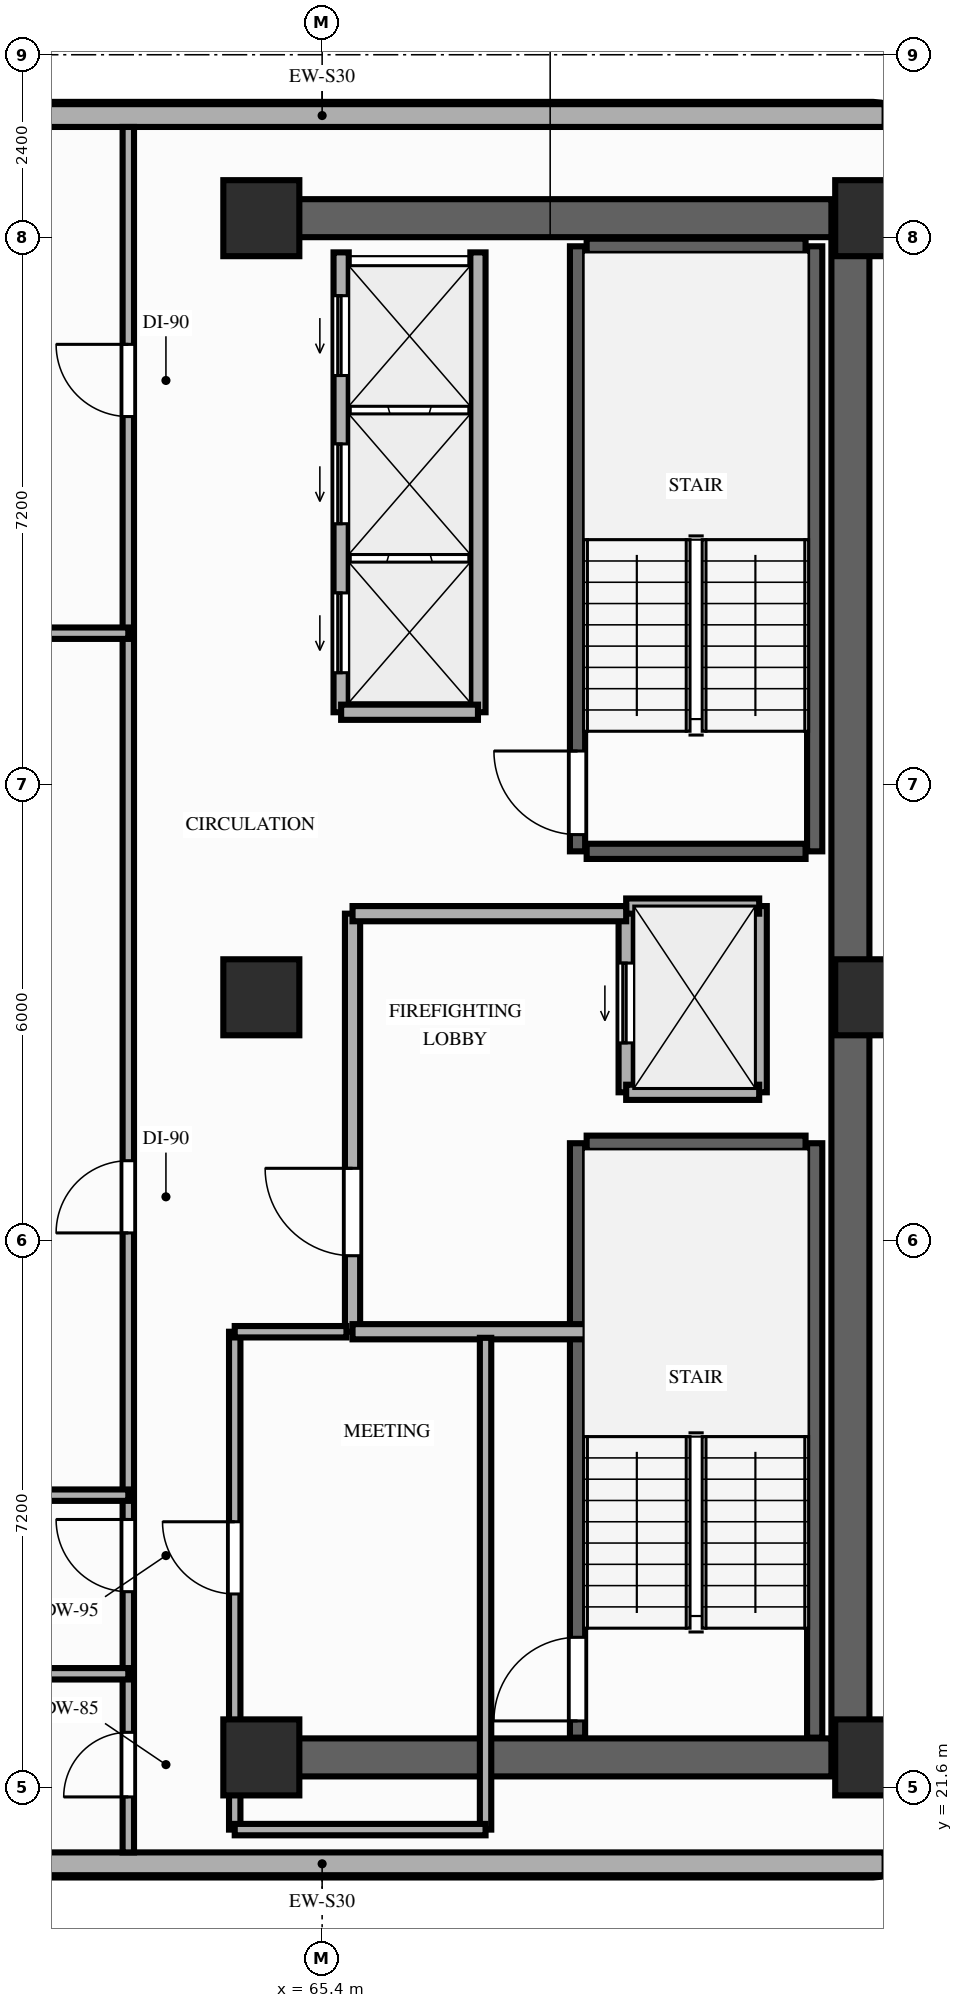
"""IFC4 building model, lengths in metres.
Left out: names, types, materials, properties, quantities, classifications, styles, units other than length and angle.
Written with IfcOpenShell. Run it as: python <this file> out.ifc"""

import sys

from ifc_helpers import new_model, si_unit, direction, frame, frame_2d, origin, origin_2d, place, context, subcontext, project, spatial, rectangle, extrude, element, fill, save


model = new_model("IFC4")
c1 = context("Model", 3, precision=1e-05, world=origin(), true_north=direction((0.0, 1.0)))
c2 = subcontext(c1, "Body", "Model", "MODEL_VIEW")
j1 = project(units=[si_unit("LENGTHUNIT", "METRE"), si_unit("PLANEANGLEUNIT", "RADIAN")], contexts=[c1])
p1 = place(None, origin())
s1 = spatial("IfcSite", under=j1, at=p1, CompositionType="ELEMENT")
p2 = place(p1, origin())
s2 = spatial("IfcBuilding", under=s1, at=p2, CompositionType="ELEMENT")
p3 = place(p2, frame((0.0, 0.0, 89.8)))
s3 = spatial("IfcBuildingStorey", under=s2, at=p3, CompositionType="ELEMENT", Elevation=89.8)
for number, where, z_axis, x_axis in (
    (1, (64.6, 22.0, 0.0), (0.0, 0.0, 1.0), (1.0, 0.0, 0.0)),
    (2, (72.65, 22.0, 0.0), (0.0, 0.0, 1.0), (1.0, 0.0, 0.0)),
    (3, (64.6, 32.0, 0.0), (0.0, 0.0, 1.0), (1.0, 0.0, 0.0)),
    (4, (72.65, 32.0, 0.0), (0.0, 0.0, 1.0), (1.0, 0.0, 0.0)),
    (5, (64.6, 42.25, 0.0), (0.0, 0.0, 1.0), (1.0, 0.0, 0.0)),
    (6, (72.65, 42.25, 0.0), (0.0, 0.0, 1.0), (1.0, 0.0, 0.0)),
):
    element("IfcColumn", number, at=place(p3, frame(where, z_axis=z_axis, x_axis=x_axis)), inside=s3, PredefinedType="COLUMN", context=c2, shape_type="SweptSolid", body=[
        extrude(rectangle(XDim=1.0, YDim=1.0, at=origin_2d()), origin(), (0.0, 0.0, 1.0), 3.2),
    ])
for number, where, z_axis, x_axis in (
    (7, (72.8, 43.6, 0.0), (0.0, 0.0, 1.0), (-1.0, 0.0, 0.0)),
    (8, (58.0, 20.6, 0.0), (0.0, 0.0, 1.0), (1.0, 0.0, 0.0)),
):
    element("IfcWall", number, at=place(p3, frame(where, z_axis=z_axis, x_axis=x_axis)), inside=s3, PredefinedType="STANDARD", context=c2, shape_type="SweptSolid", body=[
        extrude(rectangle(XDim=14.8, YDim=0.3, at=frame_2d((7.4, 0.0))), origin(), (0.0, 0.0, 1.0), 3.02),
    ])
p4 = place(p3, frame((72.35, 22.0, 0.0), z_axis=(0.0, 0.0, 1.0), x_axis=(0.0, 1.0, 0.0)))
e9 = element("IfcWall", 9, at=p4, inside=s3, PredefinedType="SHEAR", context=c2, shape_type="SweptSolid", body=[
    extrude(rectangle(XDim=20.25, YDim=0.5, at=frame_2d((10.125, 0.0))), origin(), (0.0, 0.0, 1.0), 3.02),
])
for number, where, z_axis, x_axis in (
    (10, (64.6, 42.25, 0.0), (0.0, 0.0, 1.0), (1.0, 0.0, 0.0)),
    (11, (64.6, 22.0, 0.0), (0.0, 0.0, 1.0), (1.0, 0.0, 0.0)),
):
    element("IfcWall", number, at=place(p3, frame(where, z_axis=z_axis, x_axis=x_axis)), inside=s3, PredefinedType="SHEAR", context=c2, shape_type="SweptSolid", body=[
        extrude(rectangle(XDim=7.5, YDim=0.5, at=frame_2d((3.75, 0.0))), origin(), (0.0, 0.0, 1.0), 3.02),
    ])
p5 = place(p3, frame((68.76, 22.26, 0.0), z_axis=(0.0, 0.0, 1.0), x_axis=(0.0, 1.0, 0.0)))
e12 = element("IfcWall", 12, at=p5, inside=s3, PredefinedType="SHEAR", context=c2, shape_type="SweptSolid", body=[
    extrude(rectangle(XDim=7.82, YDim=0.2, at=frame_2d((3.91, 0.0))), origin(), (0.0, 0.0, 1.0), 3.02),
])
p6 = place(p5, frame((0.22, 0.0, 0.0)))
e13 = element("IfcOpeningElement", 13, at=p6, cuts=e12, PredefinedType="OPENING", context=c2, shape_type="SweptSolid", body=[
    extrude(rectangle(XDim=1.1, YDim=2.15, at=frame_2d((0.55, 1.075))), frame((0.0, 0.11, 0.0), z_axis=(0.0, -1.0, 0.0), x_axis=(1.0, 0.0, 0.0)), (0.0, 0.0, 1.0), 0.22),
])
p7 = place(p3, frame((71.88, 22.26, 0.0), z_axis=(0.0, 0.0, 1.0), x_axis=(0.0, 1.0, 0.0)))
e14 = element("IfcWall", 14, at=p7, inside=s3, PredefinedType="SHEAR", context=c2, shape_type="SweptSolid", body=[
    extrude(rectangle(XDim=7.82, YDim=0.2, at=frame_2d((3.91, 0.0))), origin(), (0.0, 0.0, 1.0), 3.02),
])
p8 = place(p3, frame((68.88, 30.08, 0.0), z_axis=(0.0, 0.0, 1.0), x_axis=(1.0, 0.0, 0.0)))
e15 = element("IfcWall", 15, at=p8, inside=s3, PredefinedType="SHEAR", context=c2, shape_type="SweptSolid", body=[
    extrude(rectangle(XDim=2.88, YDim=0.2, at=frame_2d((1.44, 0.0))), origin(), (0.0, 0.0, 1.0), 3.02),
])
p9 = place(p3, frame((68.76, 33.92, 0.0), z_axis=(0.0, 0.0, 1.0), x_axis=(0.0, 1.0, 0.0)))
e16 = element("IfcWall", 16, at=p9, inside=s3, PredefinedType="SHEAR", context=c2, shape_type="SweptSolid", body=[
    extrude(rectangle(XDim=7.96, YDim=0.2, at=frame_2d((3.98, 0.0))), origin(), (0.0, 0.0, 1.0), 3.02),
])
p10 = place(p9, frame((0.22, 0.0, 0.0)))
e17 = element("IfcOpeningElement", 17, at=p10, cuts=e16, PredefinedType="OPENING", context=c2, shape_type="SweptSolid", body=[
    extrude(rectangle(XDim=1.1, YDim=2.15, at=frame_2d((0.55, 1.075))), frame((0.0, 0.11, 0.0), z_axis=(0.0, -1.0, 0.0), x_axis=(1.0, 0.0, 0.0)), (0.0, 0.0, 1.0), 0.22),
])
p11 = place(p3, frame((71.88, 33.92, 0.0), z_axis=(0.0, 0.0, 1.0), x_axis=(0.0, 1.0, 0.0)))
e18 = element("IfcWall", 18, at=p11, inside=s3, PredefinedType="SHEAR", context=c2, shape_type="SweptSolid", body=[
    extrude(rectangle(XDim=7.96, YDim=0.2, at=frame_2d((3.98, 0.0))), origin(), (0.0, 0.0, 1.0), 3.02),
])
for number, where, z_axis, x_axis in (
    (19, (68.88, 41.88, 0.0), (0.0, 0.0, 1.0), (1.0, 0.0, 0.0)),
    (20, (68.88, 33.92, 0.0), (0.0, 0.0, 1.0), (1.0, 0.0, 0.0)),
):
    element("IfcWall", number, at=place(p3, frame(where, z_axis=z_axis, x_axis=x_axis)), inside=s3, PredefinedType="SHEAR", context=c2, shape_type="SweptSolid", body=[
        extrude(rectangle(XDim=2.88, YDim=0.2, at=frame_2d((1.44, 0.0))), origin(), (0.0, 0.0, 1.0), 3.02),
    ])
p12 = place(p3, frame((65.65, 35.75, 0.0), z_axis=(0.0, 0.0, 1.0), x_axis=(0.0, 1.0, 0.0)))
e21 = element("IfcWall", 21, at=p12, inside=s3, PredefinedType="MOVABLE", context=c2, shape_type="SweptSolid", body=[
    extrude(rectangle(XDim=6.05, YDim=0.2, at=frame_2d((3.025, 0.0))), origin(), (0.0, 0.0, 1.0), 3.02),
])
p13 = place(p12, frame((0.52, 0.0, 0.0)))
e22 = element("IfcOpeningElement", 22, at=p13, cuts=e21, PredefinedType="OPENING", context=c2, shape_type="SweptSolid", body=[
    extrude(rectangle(XDim=1.05, YDim=2.15, at=frame_2d((0.525, 1.075))), frame((0.0, 0.11, 0.0), z_axis=(0.0, -1.0, 0.0), x_axis=(1.0, 0.0, 0.0)), (0.0, 0.0, 1.0), 0.22),
])
p14 = place(p12, frame((2.48, 0.0, 0.0)))
e23 = element("IfcOpeningElement", 23, at=p14, cuts=e21, PredefinedType="OPENING", context=c2, shape_type="SweptSolid", body=[
    extrude(rectangle(XDim=1.05, YDim=2.15, at=frame_2d((0.525, 1.075))), frame((0.0, 0.11, 0.0), z_axis=(0.0, -1.0, 0.0), x_axis=(1.0, 0.0, 0.0)), (0.0, 0.0, 1.0), 0.22),
])
p15 = place(p12, frame((4.43, 0.0, 0.0)))
e24 = element("IfcOpeningElement", 24, at=p15, cuts=e21, PredefinedType="OPENING", context=c2, shape_type="SweptSolid", body=[
    extrude(rectangle(XDim=1.05, YDim=2.15, at=frame_2d((0.525, 1.075))), frame((0.0, 0.11, 0.0), z_axis=(0.0, -1.0, 0.0), x_axis=(1.0, 0.0, 0.0)), (0.0, 0.0, 1.0), 0.22),
])
p16 = place(p3, frame((67.45, 35.75, 0.0), z_axis=(0.0, 0.0, 1.0), x_axis=(0.0, 1.0, 0.0)))
e25 = element("IfcWall", 25, at=p16, inside=s3, PredefinedType="MOVABLE", context=c2, shape_type="SweptSolid", body=[
    extrude(rectangle(XDim=6.05, YDim=0.2, at=frame_2d((3.025, 0.0))), origin(), (0.0, 0.0, 1.0), 3.02),
])
p17 = place(p3, frame((65.65, 35.75, 0.0), z_axis=(0.0, 0.0, 1.0), x_axis=(1.0, 0.0, 0.0)))
e26 = element("IfcWall", 26, at=p17, inside=s3, PredefinedType="MOVABLE", context=c2, shape_type="SweptSolid", body=[
    extrude(rectangle(XDim=1.8, YDim=0.2, at=frame_2d((0.9, 0.0))), origin(), (0.0, 0.0, 1.0), 3.02),
])
p18 = place(p3, frame((69.4, 30.75, 0.0), z_axis=(0.0, 0.0, 1.0), x_axis=(0.0, 1.0, 0.0)))
e27 = element("IfcWall", 27, at=p18, inside=s3, PredefinedType="MOVABLE", context=c2, shape_type="SweptSolid", body=[
    extrude(rectangle(XDim=2.45, YDim=0.2, at=frame_2d((1.225, 0.0))), origin(), (0.0, 0.0, 1.0), 3.02),
])
p19 = place(p18, frame((0.65, 0.0, 0.0)))
e28 = element("IfcOpeningElement", 28, at=p19, cuts=e27, PredefinedType="OPENING", context=c2, shape_type="SweptSolid", body=[
    extrude(rectangle(XDim=1.05, YDim=2.15, at=frame_2d((0.525, 1.075))), frame((0.0, 0.11, 0.0), z_axis=(0.0, -1.0, 0.0), x_axis=(1.0, 0.0, 0.0)), (0.0, 0.0, 1.0), 0.22),
])
p20 = place(p3, frame((71.15, 30.75, 0.0), z_axis=(0.0, 0.0, 1.0), x_axis=(0.0, 1.0, 0.0)))
e29 = element("IfcWall", 29, at=p20, inside=s3, PredefinedType="MOVABLE", context=c2, shape_type="SweptSolid", body=[
    extrude(rectangle(XDim=2.45, YDim=0.2, at=frame_2d((1.225, 0.0))), origin(), (0.0, 0.0, 1.0), 3.02),
])
for number, where, z_axis, x_axis in (
    (30, (69.4, 33.2, 0.0), (0.0, 0.0, 1.0), (1.0, 0.0, 0.0)),
    (31, (69.4, 30.75, 0.0), (0.0, 0.0, 1.0), (1.0, 0.0, 0.0)),
):
    element("IfcWall", number, at=place(p3, frame(where, z_axis=z_axis, x_axis=x_axis)), inside=s3, PredefinedType="MOVABLE", context=c2, shape_type="SweptSolid", body=[
        extrude(rectangle(XDim=1.75, YDim=0.2, at=frame_2d((0.875, 0.0))), origin(), (0.0, 0.0, 1.0), 3.02),
    ])
p21 = place(p3, frame((65.8, 27.6, 0.0), z_axis=(0.0, 0.0, 1.0), x_axis=(0.0, 1.0, 0.0)))
e32 = element("IfcWall", 32, at=p21, inside=s3, PredefinedType="PARTITIONING", context=c2, shape_type="SweptSolid", body=[
    extrude(rectangle(XDim=5.5, YDim=0.2, at=frame_2d((2.75, 0.0))), origin(), (0.0, 0.0, 1.0), 3.02),
])
p22 = place(p21, frame((1.0, 0.0, 0.0)))
e33 = element("IfcOpeningElement", 33, at=p22, cuts=e32, PredefinedType="OPENING", context=c2, shape_type="SweptSolid", body=[
    extrude(rectangle(XDim=1.15, YDim=2.15, at=frame_2d((0.575, 1.075))), frame((0.0, 0.11, 0.0), z_axis=(0.0, -1.0, 0.0), x_axis=(1.0, 0.0, 0.0)), (0.0, 0.0, 1.0), 0.22),
])
p23 = place(p3, frame((65.8, 33.1, 0.0), z_axis=(0.0, 0.0, 1.0), x_axis=(1.0, 0.0, 0.0)))
e34 = element("IfcWall", 34, at=p23, inside=s3, PredefinedType="PARTITIONING", context=c2, shape_type="SweptSolid", body=[
    extrude(rectangle(XDim=3.6, YDim=0.2, at=frame_2d((1.8, 0.0))), origin(), (0.0, 0.0, 1.0), 3.02),
])
p24 = place(p3, frame((65.8, 27.6, 0.0), z_axis=(0.0, 0.0, 1.0), x_axis=(1.0, 0.0, 0.0)))
e35 = element("IfcWall", 35, at=p24, inside=s3, PredefinedType="PARTITIONING", context=c2, shape_type="SweptSolid", body=[
    extrude(rectangle(XDim=3.4, YDim=0.2, at=frame_2d((1.7, 0.0))), origin(), (0.0, 0.0, 1.0), 3.02),
])
p25 = place(p3, frame((64.25, 21.05, 0.0), z_axis=(0.0, 0.0, 1.0), x_axis=(0.0, 1.0, 0.0)))
e36 = element("IfcWall", 36, at=p25, inside=s3, PredefinedType="PARTITIONING", context=c2, shape_type="SweptSolid", body=[
    extrude(rectangle(XDim=6.55, YDim=0.15, at=frame_2d((3.275, 0.0))), origin(), (0.0, 0.0, 1.0), 2.61),
])
p26 = place(p25, frame((3.1, 0.0, 0.0)))
e37 = element("IfcOpeningElement", 37, at=p26, cuts=e36, PredefinedType="OPENING", context=c2, shape_type="SweptSolid", body=[
    extrude(rectangle(XDim=0.95, YDim=2.15, at=frame_2d((0.475, 1.075))), frame((0.0, 0.085, 0.0), z_axis=(0.0, -1.0, 0.0), x_axis=(1.0, 0.0, 0.0)), (0.0, 0.0, 1.0), 0.17),
])
p27 = place(p3, frame((67.55, 21.05, 0.0), z_axis=(0.0, 0.0, 1.0), x_axis=(0.0, 1.0, 0.0)))
e38 = element("IfcWall", 38, at=p27, inside=s3, PredefinedType="PARTITIONING", context=c2, shape_type="SweptSolid", body=[
    extrude(rectangle(XDim=6.47, YDim=0.15, at=frame_2d((3.235, 0.0))), origin(), (0.0, 0.0, 1.0), 2.61),
])
p28 = place(p3, frame((64.25, 21.05, 0.0), z_axis=(0.0, 0.0, 1.0), x_axis=(1.0, 0.0, 0.0)))
e39 = element("IfcWall", 39, at=p28, inside=s3, PredefinedType="PARTITIONING", context=c2, shape_type="SweptSolid", body=[
    extrude(rectangle(XDim=3.3, YDim=0.15, at=frame_2d((1.65, 0.0))), origin(), (0.0, 0.0, 1.0), 3.02),
])
p29 = place(p3, frame((64.25, 27.6, 0.0), z_axis=(0.0, 0.0, 1.0), x_axis=(1.0, 0.0, 0.0)))
e40 = element("IfcWall", 40, at=p29, inside=s3, PredefinedType="PARTITIONING", context=c2, shape_type="SweptSolid", body=[
    extrude(rectangle(XDim=1.47, YDim=0.15, at=frame_2d((0.735, 0.0))), origin(), (0.0, 0.0, 1.0), 2.61),
])
p30 = place(p3, frame((62.85, 20.75, 0.0), z_axis=(0.0, 0.0, 1.0), x_axis=(0.0, 1.0, 0.0)))
e41 = element("IfcWall", 41, at=p30, inside=s3, PredefinedType="PARTITIONING", context=c2, shape_type="SweptSolid", body=[
    extrude(rectangle(XDim=22.7, YDim=0.15, at=frame_2d((11.35, 0.0))), origin(), (0.0, 0.0, 1.0), 2.61),
])
p31 = place(p30, frame((0.73, 0.0, 0.0)))
e42 = element("IfcOpeningElement", 42, at=p31, cuts=e41, PredefinedType="OPENING", context=c2, shape_type="SweptSolid", body=[
    extrude(rectangle(XDim=0.85, YDim=2.1, at=frame_2d((0.425, 1.05))), frame((0.0, 0.085, 0.0), z_axis=(0.0, -1.0, 0.0), x_axis=(1.0, 0.0, 0.0)), (0.0, 0.0, 1.0), 0.17),
])
p32 = place(p30, frame((3.43, 0.0, 0.0)))
e43 = element("IfcOpeningElement", 43, at=p32, cuts=e41, PredefinedType="OPENING", context=c2, shape_type="SweptSolid", body=[
    extrude(rectangle(XDim=0.95, YDim=2.1, at=frame_2d((0.475, 1.05))), frame((0.0, 0.085, 0.0), z_axis=(0.0, -1.0, 0.0), x_axis=(1.0, 0.0, 0.0)), (0.0, 0.0, 1.0), 0.17),
])
p33 = place(p30, frame((8.15, 0.0, 0.0)))
e44 = element("IfcOpeningElement", 44, at=p33, cuts=e41, PredefinedType="OPENING", context=c2, shape_type="SweptSolid", body=[
    extrude(rectangle(XDim=0.95, YDim=2.15, at=frame_2d((0.475, 1.075))), frame((0.0, 0.085, 0.0), z_axis=(0.0, -1.0, 0.0), x_axis=(1.0, 0.0, 0.0)), (0.0, 0.0, 1.0), 0.17),
])
p34 = place(p30, frame((18.89, 0.0, 0.0)))
e45 = element("IfcOpeningElement", 45, at=p34, cuts=e41, PredefinedType="OPENING", context=c2, shape_type="SweptSolid", body=[
    extrude(rectangle(XDim=0.95, YDim=2.15, at=frame_2d((0.475, 1.075))), frame((0.0, 0.085, 0.0), z_axis=(0.0, -1.0, 0.0), x_axis=(1.0, 0.0, 0.0)), (0.0, 0.0, 1.0), 0.17),
])
for number, where, z_axis, x_axis in (
    (46, (57.95, 23.1, 0.0), (0.0, 0.0, 1.0), (1.0, 0.0, 0.0)),
    (47, (57.95, 25.45, 0.0), (0.0, 0.0, 1.0), (1.0, 0.0, 0.0)),
    (48, (57.95, 36.79, 0.0), (0.0, 0.0, 1.0), (1.0, 0.0, 0.0)),
):
    element("IfcWall", number, at=place(p3, frame(where, z_axis=z_axis, x_axis=x_axis)), inside=s3, PredefinedType="PARTITIONING", context=c2, shape_type="SweptSolid", body=[
        extrude(rectangle(XDim=4.9, YDim=0.15, at=frame_2d((2.45, 0.0))), origin(), (0.0, 0.0, 1.0), 2.61),
    ])
p35 = place(p6, origin())
e49 = element("IfcDoor", 49, at=p35, inside=s3, OperationType="SINGLE_SWING_LEFT", PredefinedType="DOOR", context=c2, shape_type="SweptSolid", body=[
    extrude(rectangle(XDim=1.1, YDim=2.15, at=frame_2d((0.55, 1.075))), frame((0.0, 0.025, 0.0), z_axis=(0.0, -1.0, 0.0), x_axis=(1.0, 0.0, 0.0)), (0.0, 0.0, 1.0), 0.05),
])
fill(e13, e49)
p36 = place(p10, origin())
e50 = element("IfcDoor", 50, at=p36, inside=s3, OperationType="SINGLE_SWING_RIGHT", PredefinedType="DOOR", context=c2, shape_type="SweptSolid", body=[
    extrude(rectangle(XDim=1.1, YDim=2.15, at=frame_2d((0.55, 1.075))), frame((0.0, 0.025, 0.0), z_axis=(0.0, -1.0, 0.0), x_axis=(1.0, 0.0, 0.0)), (0.0, 0.0, 1.0), 0.05),
])
fill(e17, e50)
p37 = place(p13, origin())
e51 = element("IfcDoor", 51, at=p37, inside=s3, OperationType="SLIDING_TO_LEFT", PredefinedType="DOOR", context=c2, shape_type="SweptSolid", body=[
    extrude(rectangle(XDim=1.05, YDim=2.15, at=frame_2d((0.525, 1.075))), frame((0.0, 0.025, 0.0), z_axis=(0.0, -1.0, 0.0), x_axis=(1.0, 0.0, 0.0)), (0.0, 0.0, 1.0), 0.05),
])
fill(e22, e51)
p38 = place(p14, origin())
e52 = element("IfcDoor", 52, at=p38, inside=s3, OperationType="SLIDING_TO_LEFT", PredefinedType="DOOR", context=c2, shape_type="SweptSolid", body=[
    extrude(rectangle(XDim=1.05, YDim=2.15, at=frame_2d((0.525, 1.075))), frame((0.0, 0.025, 0.0), z_axis=(0.0, -1.0, 0.0), x_axis=(1.0, 0.0, 0.0)), (0.0, 0.0, 1.0), 0.05),
])
fill(e23, e52)
p39 = place(p15, origin())
e53 = element("IfcDoor", 53, at=p39, inside=s3, OperationType="SLIDING_TO_LEFT", PredefinedType="DOOR", context=c2, shape_type="SweptSolid", body=[
    extrude(rectangle(XDim=1.05, YDim=2.15, at=frame_2d((0.525, 1.075))), frame((0.0, 0.025, 0.0), z_axis=(0.0, -1.0, 0.0), x_axis=(1.0, 0.0, 0.0)), (0.0, 0.0, 1.0), 0.05),
])
fill(e24, e53)
p40 = place(p19, origin())
e54 = element("IfcDoor", 54, at=p40, inside=s3, OperationType="SLIDING_TO_LEFT", PredefinedType="DOOR", context=c2, shape_type="SweptSolid", body=[
    extrude(rectangle(XDim=1.05, YDim=2.15, at=frame_2d((0.525, 1.075))), frame((0.0, 0.025, 0.0), z_axis=(0.0, -1.0, 0.0), x_axis=(1.0, 0.0, 0.0)), (0.0, 0.0, 1.0), 0.05),
])
fill(e28, e54)
p41 = place(p22, origin())
e55 = element("IfcDoor", 55, at=p41, inside=s3, OperationType="SINGLE_SWING_RIGHT", PredefinedType="DOOR", context=c2, shape_type="SweptSolid", body=[
    extrude(rectangle(XDim=1.15, YDim=2.15, at=frame_2d((0.575, 1.075))), frame((0.0, 0.025, 0.0), z_axis=(0.0, -1.0, 0.0), x_axis=(1.0, 0.0, 0.0)), (0.0, 0.0, 1.0), 0.05),
])
fill(e33, e55)
p42 = place(p26, origin())
e56 = element("IfcDoor", 56, at=p42, inside=s3, OperationType="SINGLE_SWING_RIGHT", PredefinedType="DOOR", context=c2, shape_type="SweptSolid", body=[
    extrude(rectangle(XDim=0.95, YDim=2.15, at=frame_2d((0.475, 1.075))), frame((0.0, 0.025, 0.0), z_axis=(0.0, -1.0, 0.0), x_axis=(1.0, 0.0, 0.0)), (0.0, 0.0, 1.0), 0.05),
])
fill(e37, e56)
p43 = place(p31, origin())
e57 = element("IfcDoor", 57, at=p43, inside=s3, OperationType="SINGLE_SWING_LEFT", PredefinedType="DOOR", context=c2, shape_type="SweptSolid", body=[
    extrude(rectangle(XDim=0.85, YDim=2.1, at=frame_2d((0.425, 1.05))), frame((0.0, 0.025, 0.0), z_axis=(0.0, -1.0, 0.0), x_axis=(1.0, 0.0, 0.0)), (0.0, 0.0, 1.0), 0.05),
])
fill(e42, e57)
p44 = place(p32, origin())
e58 = element("IfcDoor", 58, at=p44, inside=s3, OperationType="SINGLE_SWING_RIGHT", PredefinedType="DOOR", context=c2, shape_type="SweptSolid", body=[
    extrude(rectangle(XDim=0.95, YDim=2.1, at=frame_2d((0.475, 1.05))), frame((0.0, 0.025, 0.0), z_axis=(0.0, -1.0, 0.0), x_axis=(1.0, 0.0, 0.0)), (0.0, 0.0, 1.0), 0.05),
])
fill(e43, e58)
p45 = place(p33, origin())
e59 = element("IfcDoor", 59, at=p45, inside=s3, OperationType="SINGLE_SWING_LEFT", PredefinedType="DOOR", context=c2, shape_type="SweptSolid", body=[
    extrude(rectangle(XDim=0.95, YDim=2.15, at=frame_2d((0.475, 1.075))), frame((0.0, 0.025, 0.0), z_axis=(0.0, -1.0, 0.0), x_axis=(1.0, 0.0, 0.0)), (0.0, 0.0, 1.0), 0.05),
])
fill(e44, e59)
p46 = place(p34, origin())
e60 = element("IfcDoor", 60, at=p46, inside=s3, OperationType="SINGLE_SWING_RIGHT", PredefinedType="DOOR", context=c2, shape_type="SweptSolid", body=[
    extrude(rectangle(XDim=0.95, YDim=2.15, at=frame_2d((0.475, 1.075))), frame((0.0, 0.025, 0.0), z_axis=(0.0, -1.0, 0.0), x_axis=(1.0, 0.0, 0.0)), (0.0, 0.0, 1.0), 0.05),
])
fill(e45, e60)
save(model, sys.argv[1])
